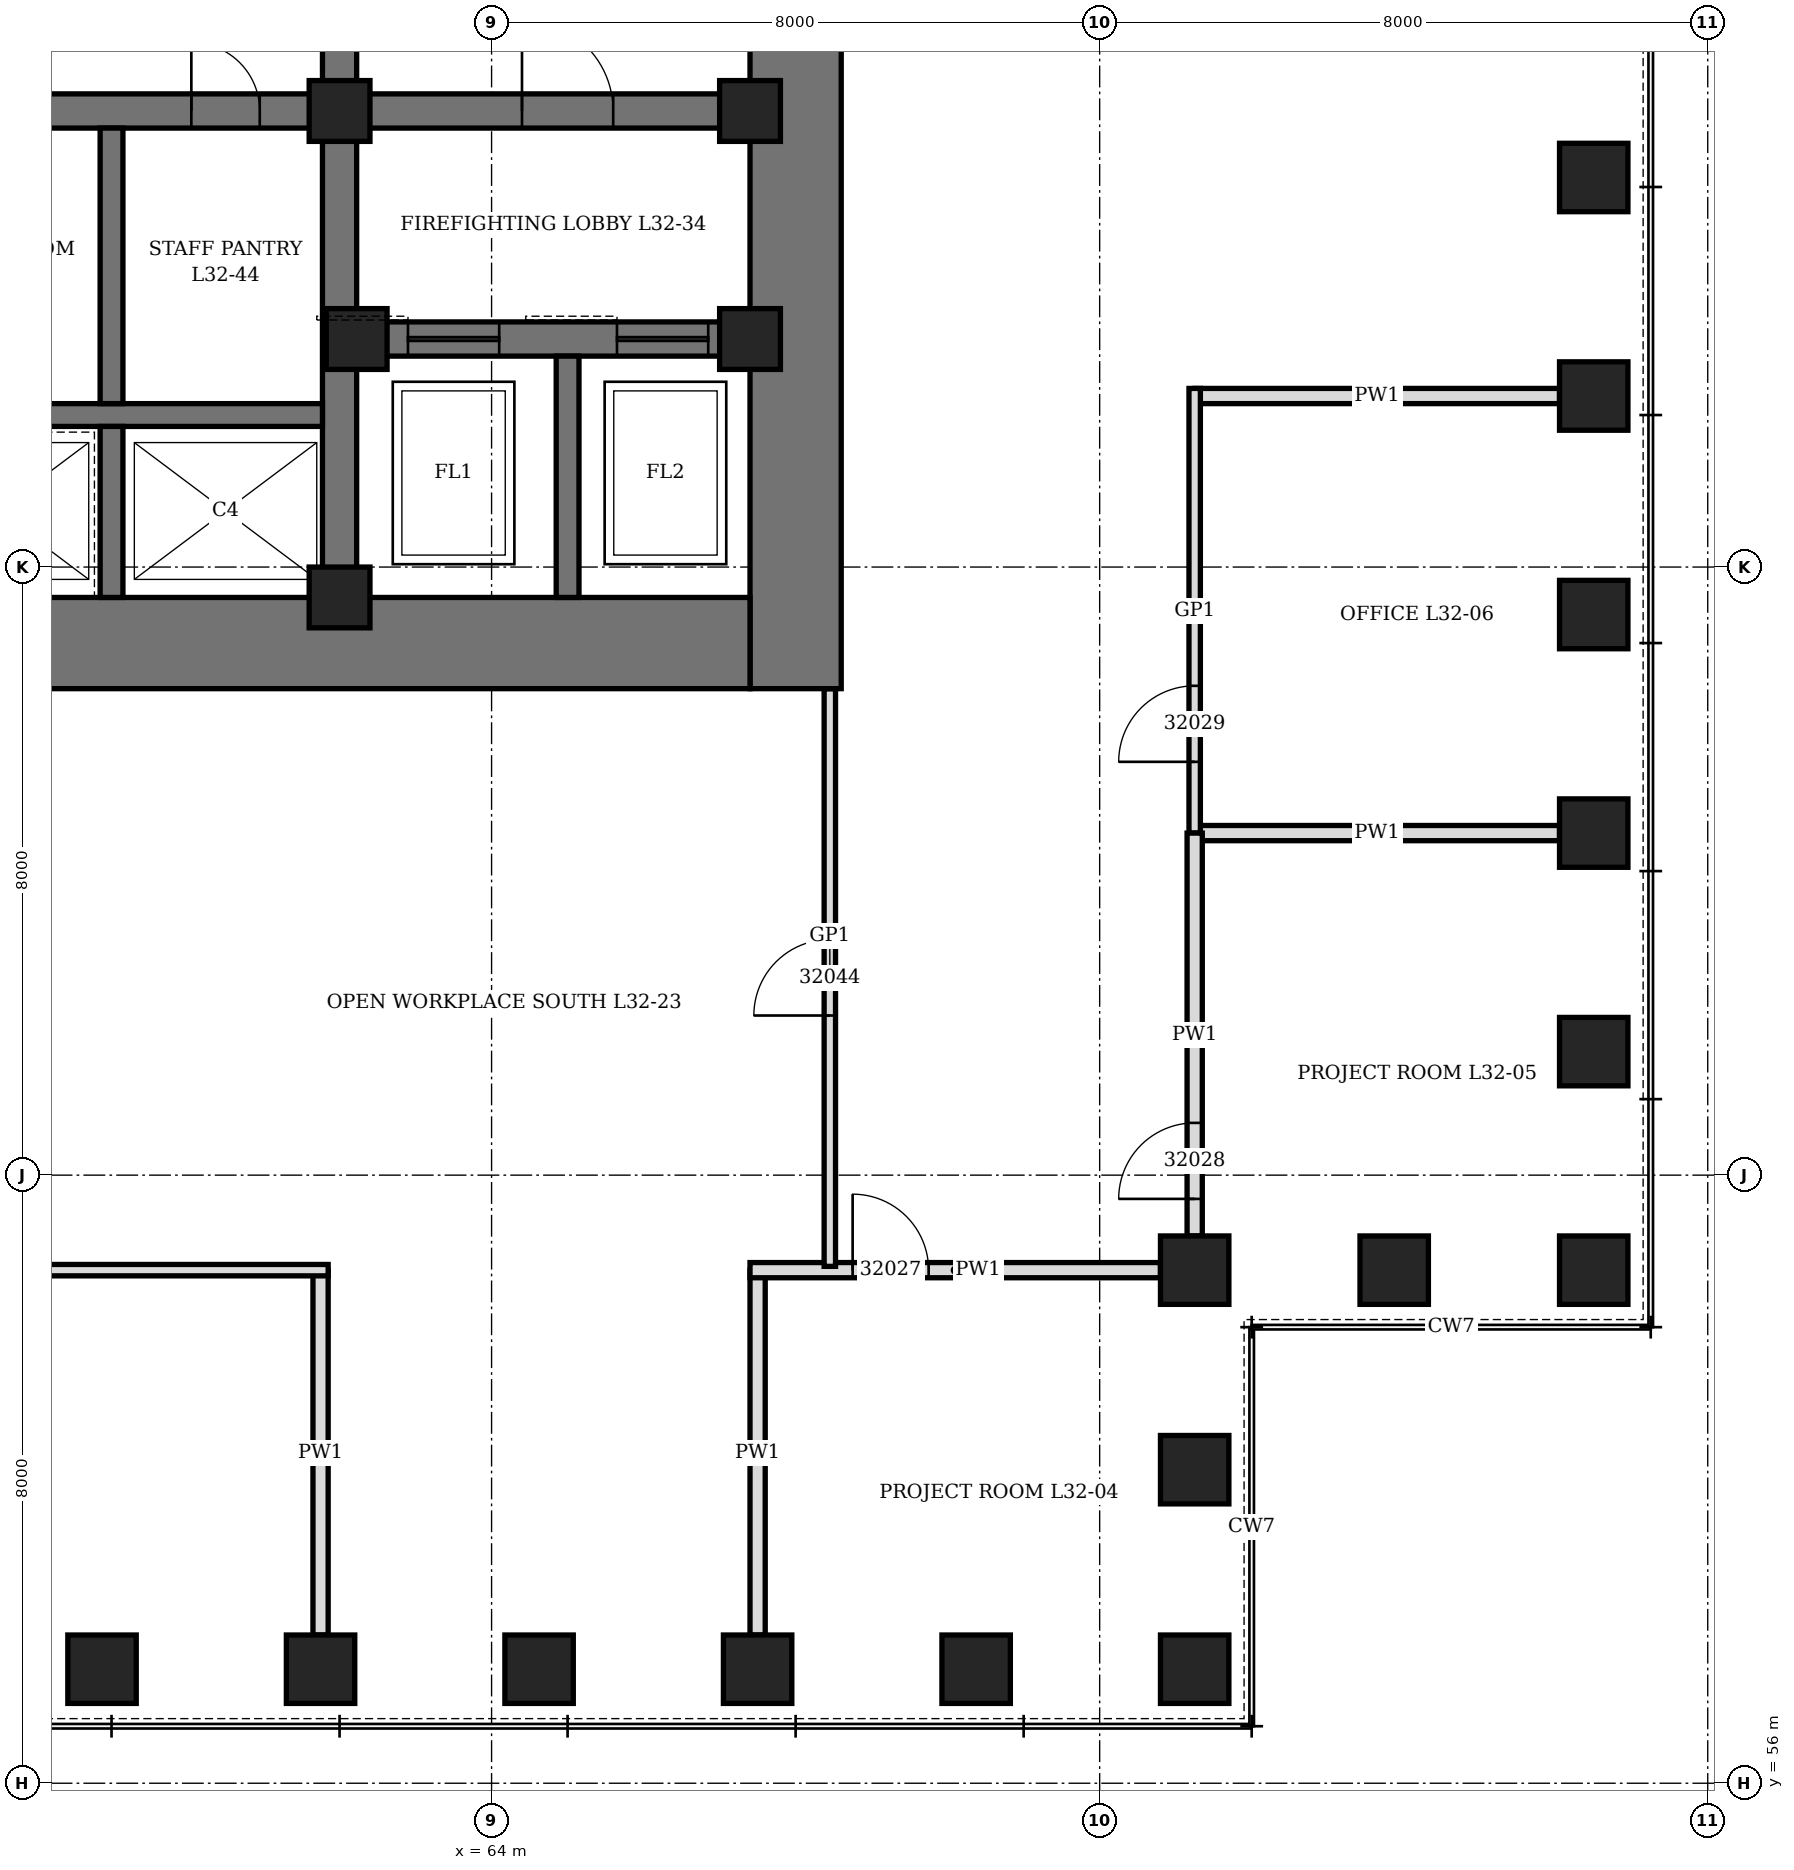
"""IFC4 building model, lengths in metres.
Left out: names, types, materials, properties, quantities, classifications, styles, units other than length and angle.
Written with IfcOpenShell. Run it as: python <this file> out.ifc"""

import sys

from ifc_helpers import new_model, si_unit, direction, frame, frame_2d, origin, origin_2d, place, context, subcontext, project, spatial, rectangle, hollow_rectangle, extrude, element, fill, save


model = new_model("IFC4")
c1 = context("Model", 3, precision=1e-05, world=origin(), true_north=direction((0.0, 1.0)))
c2 = subcontext(c1, "Body", "Model", "MODEL_VIEW")
j1 = project(units=[si_unit("LENGTHUNIT", "METRE"), si_unit("PLANEANGLEUNIT", "RADIAN")], contexts=[c1])
p1 = place(None, origin())
s1 = spatial("IfcSite", under=j1, at=p1, CompositionType="ELEMENT")
p2 = place(p1, origin())
s2 = spatial("IfcBuilding", under=s1, at=p2, CompositionType="ELEMENT")
p3 = place(p2, frame((0.0, 0.0, 145.9)))
s3 = spatial("IfcBuildingStorey", under=s2, at=p3, CompositionType="ELEMENT", Elevation=145.9)
for number, where, z_axis, x_axis in (
    (1, (58.875, 57.5, 0.0), (0.0, 0.0, 1.0), (1.0, 0.0, 0.0)),
    (2, (61.75, 57.5, 0.0), (0.0, 0.0, 1.0), (1.0, 0.0, 0.0)),
    (3, (64.625, 57.5, 0.0), (0.0, 0.0, 1.0), (1.0, 0.0, 0.0)),
    (4, (67.5, 57.5, 0.0), (0.0, 0.0, 1.0), (1.0, 0.0, 0.0)),
    (5, (70.375, 57.5, 0.0), (0.0, 0.0, 1.0), (1.0, 0.0, 0.0)),
    (6, (73.25, 57.5, 0.0), (0.0, 0.0, 1.0), (0.0, 1.0, 0.0)),
    (7, (73.25, 60.125, 0.0), (0.0, 0.0, 1.0), (0.0, 1.0, 0.0)),
    (8, (73.25, 62.75, 0.0), (0.0, 0.0, 1.0), (1.0, 0.0, 0.0)),
    (9, (75.875, 62.75, 0.0), (0.0, 0.0, 1.0), (1.0, 0.0, 0.0)),
    (10, (78.5, 62.75, 0.0), (0.0, 0.0, 1.0), (0.0, 1.0, 0.0)),
    (11, (78.5, 65.625, 0.0), (0.0, 0.0, 1.0), (0.0, 1.0, 0.0)),
    (12, (78.5, 68.5, 0.0), (0.0, 0.0, 1.0), (0.0, 1.0, 0.0)),
    (13, (78.5, 71.375, 0.0), (0.0, 0.0, 1.0), (0.0, 1.0, 0.0)),
    (14, (78.5, 74.25, 0.0), (0.0, 0.0, 1.0), (0.0, 1.0, 0.0)),
    (15, (78.5, 77.125, 0.0), (0.0, 0.0, 1.0), (0.0, 1.0, 0.0)),
):
    element("IfcColumn", number, at=place(p3, frame(where, z_axis=z_axis, x_axis=x_axis)), inside=s3, PredefinedType="COLUMN", context=c2, shape_type="SweptSolid", body=[
        extrude(hollow_rectangle(XDim=0.9, YDim=0.9, WallThickness=0.12, at=origin_2d()), origin(), (0.0, 0.0, 1.0), 4.2),
    ])
p4 = place(p3, frame((68.0, 70.4, 0.0), z_axis=(0.0, 0.0, 1.0), x_axis=(0.0, 1.0, 0.0)))
e16 = element("IfcWall", 16, at=p4, inside=s3, PredefinedType="SHEAR", context=c2, shape_type="SweptSolid", body=[
    extrude(rectangle(XDim=19.2, YDim=1.2, at=frame_2d((9.6, 0.0))), origin(), (0.0, 0.0, 1.0), 4.2),
])
p5 = place(p4, frame((8.6, 0.0, 0.0)))
e17 = element("IfcOpeningElement", 17, at=p5, cuts=e16, PredefinedType="OPENING", context=c2, shape_type="SweptSolid", body=[
    extrude(rectangle(XDim=2.0, YDim=2.4, at=frame_2d((1.0, 1.2))), frame((0.0, 0.61, 0.0), z_axis=(0.0, -1.0, 0.0), x_axis=(1.0, 0.0, 0.0)), (0.0, 0.0, 1.0), 1.22),
])
p6 = place(p3, frame((44.6, 71.0, 0.0), z_axis=(0.0, 0.0, 1.0), x_axis=(1.0, 0.0, 0.0)))
e18 = element("IfcWall", 18, at=p6, inside=s3, PredefinedType="SHEAR", context=c2, shape_type="SweptSolid", body=[
    extrude(rectangle(XDim=22.8, YDim=1.2, at=frame_2d((11.4, 0.0))), origin(), (0.0, 0.0, 1.0), 4.2),
])
p7 = place(p3, frame((62.0, 71.6, 0.0), z_axis=(0.0, 0.0, 1.0), x_axis=(0.0, 1.0, 0.0)))
e19 = element("IfcWall", 19, at=p7, inside=s3, PredefinedType="SHEAR", context=c2, shape_type="SweptSolid", body=[
    extrude(rectangle(XDim=16.8, YDim=0.45, at=frame_2d((8.4, 0.0))), origin(), (0.0, 0.0, 1.0), 4.2),
])
p8 = place(p7, frame((7.5, 0.0, 0.0)))
e20 = element("IfcOpeningElement", 20, at=p8, cuts=e19, PredefinedType="OPENING", context=c2, shape_type="SweptSolid", body=[
    extrude(rectangle(XDim=1.8, YDim=2.4, at=frame_2d((0.9, 1.2))), frame((0.0, 0.235, 0.0), z_axis=(0.0, -1.0, 0.0), x_axis=(1.0, 0.0, 0.0)), (0.0, 0.0, 1.0), 0.47),
])
p9 = place(p3, frame((62.225, 75.0, 0.0), z_axis=(0.0, 0.0, 1.0), x_axis=(1.0, 0.0, 0.0)))
e21 = element("IfcWall", 21, at=p9, inside=s3, PredefinedType="SHEAR", context=c2, shape_type="SweptSolid", body=[
    extrude(rectangle(XDim=5.175, YDim=0.45, at=frame_2d((2.587, 0.0))), origin(), (0.0, 0.0, 1.0), 4.2),
])
p10 = place(p9, frame((0.675, 0.0, 0.0)))
e22 = element("IfcOpeningElement", 22, at=p10, cuts=e21, PredefinedType="OPENING", context=c2, shape_type="SweptSolid", body=[
    extrude(rectangle(XDim=1.2, YDim=2.2, at=frame_2d((0.6, 1.1))), frame((0.0, 0.235, 0.0), z_axis=(0.0, -1.0, 0.0), x_axis=(1.0, 0.0, 0.0)), (0.0, 0.0, 1.0), 0.47),
])
p11 = place(p9, frame((3.425, 0.0, 0.0)))
e23 = element("IfcOpeningElement", 23, at=p11, cuts=e21, PredefinedType="OPENING", context=c2, shape_type="SweptSolid", body=[
    extrude(rectangle(XDim=1.2, YDim=2.2, at=frame_2d((0.6, 1.1))), frame((0.0, 0.235, 0.0), z_axis=(0.0, -1.0, 0.0), x_axis=(1.0, 0.0, 0.0)), (0.0, 0.0, 1.0), 0.47),
])
p12 = place(p3, frame((62.225, 78.0, 0.0), z_axis=(0.0, 0.0, 1.0), x_axis=(1.0, 0.0, 0.0)))
e24 = element("IfcWall", 24, at=p12, inside=s3, PredefinedType="SHEAR", context=c2, shape_type="SweptSolid", body=[
    extrude(rectangle(XDim=5.175, YDim=0.45, at=frame_2d((2.587, 0.0))), origin(), (0.0, 0.0, 1.0), 4.2),
])
p13 = place(p12, frame((2.175, 0.0, 0.0)))
e25 = element("IfcOpeningElement", 25, at=p13, cuts=e24, PredefinedType="OPENING", context=c2, shape_type="SweptSolid", body=[
    extrude(rectangle(XDim=1.2, YDim=2.1, at=frame_2d((0.6, 1.05))), frame((0.0, 0.235, 0.0), z_axis=(0.0, -1.0, 0.0), x_axis=(1.0, 0.0, 0.0)), (0.0, 0.0, 1.0), 0.47),
])
p14 = place(p3, frame((50.225, 78.0, 0.0), z_axis=(0.0, 0.0, 1.0), x_axis=(1.0, 0.0, 0.0)))
e26 = element("IfcWall", 26, at=p14, inside=s3, PredefinedType="SHEAR", context=c2, shape_type="SweptSolid", body=[
    extrude(rectangle(XDim=11.55, YDim=0.45, at=frame_2d((5.775, 0.0))), origin(), (0.0, 0.0, 1.0), 4.2),
])
p15 = place(p14, frame((0.825, 0.0, 0.0)))
e27 = element("IfcOpeningElement", 27, at=p15, cuts=e26, PredefinedType="OPENING", context=c2, shape_type="SweptSolid", body=[
    extrude(rectangle(XDim=0.9, YDim=2.1, at=frame_2d((0.45, 1.05))), frame((0.0, 0.235, 0.0), z_axis=(0.0, -1.0, 0.0), x_axis=(1.0, 0.0, 0.0)), (0.0, 0.0, 1.0), 0.47),
])
p16 = place(p14, frame((3.825, 0.0, 0.0)))
e28 = element("IfcOpeningElement", 28, at=p16, cuts=e26, PredefinedType="OPENING", context=c2, shape_type="SweptSolid", body=[
    extrude(rectangle(XDim=0.9, YDim=2.1, at=frame_2d((0.45, 1.05))), frame((0.0, 0.235, 0.0), z_axis=(0.0, -1.0, 0.0), x_axis=(1.0, 0.0, 0.0)), (0.0, 0.0, 1.0), 0.47),
])
p17 = place(p14, frame((6.825, 0.0, 0.0)))
e29 = element("IfcOpeningElement", 29, at=p17, cuts=e26, PredefinedType="OPENING", context=c2, shape_type="SweptSolid", body=[
    extrude(rectangle(XDim=0.9, YDim=2.1, at=frame_2d((0.45, 1.05))), frame((0.0, 0.235, 0.0), z_axis=(0.0, -1.0, 0.0), x_axis=(1.0, 0.0, 0.0)), (0.0, 0.0, 1.0), 0.47),
])
p18 = place(p14, frame((9.825, 0.0, 0.0)))
e30 = element("IfcOpeningElement", 30, at=p18, cuts=e26, PredefinedType="OPENING", context=c2, shape_type="SweptSolid", body=[
    extrude(rectangle(XDim=0.9, YDim=2.1, at=frame_2d((0.45, 1.05))), frame((0.0, 0.235, 0.0), z_axis=(0.0, -1.0, 0.0), x_axis=(1.0, 0.0, 0.0)), (0.0, 0.0, 1.0), 0.47),
])
p19 = place(p3, frame((50.225, 74.0, 0.0), z_axis=(0.0, 0.0, 1.0), x_axis=(1.0, 0.0, 0.0)))
e31 = element("IfcWall", 31, at=p19, inside=s3, PredefinedType="SHEAR", context=c2, shape_type="SweptSolid", body=[
    extrude(rectangle(XDim=11.55, YDim=0.3, at=frame_2d((5.775, 0.0))), origin(), (0.0, 0.0, 1.0), 4.2),
])
p20 = place(p3, frame((59.0, 71.6, 0.0), z_axis=(0.0, 0.0, 1.0), x_axis=(0.0, 1.0, 0.0)))
e32 = element("IfcWall", 32, at=p20, inside=s3, PredefinedType="SHEAR", context=c2, shape_type="SweptSolid", body=[
    extrude(rectangle(XDim=2.25, YDim=0.3, at=frame_2d((1.125, 0.0))), origin(), (0.0, 0.0, 1.0), 4.2),
])
p21 = place(p3, frame((59.0, 74.15, 0.0), z_axis=(0.0, 0.0, 1.0), x_axis=(0.0, 1.0, 0.0)))
e33 = element("IfcWall", 33, at=p21, inside=s3, PredefinedType="SHEAR", context=c2, shape_type="SweptSolid", body=[
    extrude(rectangle(XDim=3.625, YDim=0.3, at=frame_2d((1.812, 0.0))), origin(), (0.0, 0.0, 1.0), 4.2),
])
p22 = place(p3, frame((65.0, 71.6, 0.0), z_axis=(0.0, 0.0, 1.0), x_axis=(0.0, 1.0, 0.0)))
e34 = element("IfcWall", 34, at=p22, inside=s3, PredefinedType="SHEAR", context=c2, shape_type="SweptSolid", body=[
    extrude(rectangle(XDim=3.175, YDim=0.3, at=frame_2d((1.587, 0.0))), origin(), (0.0, 0.0, 1.0), 4.2),
])
for number, where, z_axis, x_axis in (
    (35, (62.0, 71.6, 0.0), (0.0, 0.0, 1.0), (1.0, 0.0, 0.0)),
    (36, (62.0, 78.0, 0.0), (0.0, 0.0, 1.0), (1.0, 0.0, 0.0)),
    (37, (62.225, 75.0, 0.0), (0.0, 0.0, 1.0), (1.0, 0.0, 0.0)),
    (38, (67.4, 75.0, 0.0), (0.0, 0.0, 1.0), (1.0, 0.0, 0.0)),
    (39, (67.4, 78.0, 0.0), (0.0, 0.0, 1.0), (1.0, 0.0, 0.0)),
):
    element("IfcColumn", number, at=place(p3, frame(where, z_axis=z_axis, x_axis=x_axis)), inside=s3, PredefinedType="COLUMN", context=c2, shape_type="SweptSolid", body=[
        extrude(hollow_rectangle(XDim=0.8, YDim=0.8, WallThickness=0.1, at=origin_2d()), origin(), (0.0, 0.0, 1.0), 4.2),
    ])
p23 = place(p3, frame((61.75, 57.95, 0.0), z_axis=(0.0, 0.0, 1.0), x_axis=(0.0, 1.0, 0.0)))
e40 = element("IfcWall", 40, at=p23, inside=s3, PredefinedType="PARTITIONING", context=c2, shape_type="SweptSolid", body=[
    extrude(rectangle(XDim=4.8, YDim=0.2, at=frame_2d((2.4, 0.0))), origin(), (0.0, 0.0, 1.0), 3.278),
])
p24 = place(p3, frame((67.5, 57.95, 0.0), z_axis=(0.0, 0.0, 1.0), x_axis=(0.0, 1.0, 0.0)))
e41 = element("IfcWall", 41, at=p24, inside=s3, PredefinedType="PARTITIONING", context=c2, shape_type="SweptSolid", body=[
    extrude(rectangle(XDim=4.8, YDim=0.2, at=frame_2d((2.4, 0.0))), origin(), (0.0, 0.0, 1.0), 2.74),
])
for number, where, z_axis, x_axis in (
    (42, (73.25, 68.5, 0.0), (0.0, 0.0, 1.0), (1.0, 0.0, 0.0)),
    (43, (73.25, 74.25, 0.0), (0.0, 0.0, 1.0), (1.0, 0.0, 0.0)),
):
    element("IfcWall", number, at=place(p3, frame(where, z_axis=z_axis, x_axis=x_axis)), inside=s3, PredefinedType="PARTITIONING", context=c2, shape_type="SweptSolid", body=[
        extrude(rectangle(XDim=4.8, YDim=0.2, at=frame_2d((2.4, 0.0))), origin(), (0.0, 0.0, 1.0), 3.428),
    ])
p25 = place(p3, frame((50.15, 62.75, 0.0), z_axis=(0.0, 0.0, 1.0), x_axis=(1.0, 0.0, 0.0)))
e44 = element("IfcWall", 44, at=p25, inside=s3, PredefinedType="PARTITIONING", context=c2, shape_type="SweptSolid", body=[
    extrude(rectangle(XDim=11.7, YDim=0.15, at=frame_2d((5.85, 0.0))), origin(), (0.0, 0.0, 1.0), 4.04),
])
p26 = place(p25, frame((3.913, 0.0, 0.0)))
e45 = element("IfcOpeningElement", 45, at=p26, cuts=e44, PredefinedType="OPENING", context=c2, shape_type="SweptSolid", body=[
    extrude(rectangle(XDim=1.0, YDim=2.4, at=frame_2d((0.5, 1.2))), frame((0.0, 0.085, 0.0), z_axis=(0.0, -1.0, 0.0), x_axis=(1.0, 0.0, 0.0)), (0.0, 0.0, 1.0), 0.17),
])
p27 = place(p3, frame((67.4, 62.75, 0.0), z_axis=(0.0, 0.0, 1.0), x_axis=(1.0, 0.0, 0.0)))
e46 = element("IfcWall", 46, at=p27, inside=s3, PredefinedType="PARTITIONING", context=c2, shape_type="SweptSolid", body=[
    extrude(rectangle(XDim=5.4, YDim=0.2, at=frame_2d((2.7, 0.0))), origin(), (0.0, 0.0, 1.0), 4.04),
])
p28 = place(p27, frame((1.35, 0.0, 0.0)))
e47 = element("IfcOpeningElement", 47, at=p28, cuts=e46, PredefinedType="OPENING", context=c2, shape_type="SweptSolid", body=[
    extrude(rectangle(XDim=1.0, YDim=2.1, at=frame_2d((0.5, 1.05))), frame((0.0, 0.11, 0.0), z_axis=(0.0, -1.0, 0.0), x_axis=(1.0, 0.0, 0.0)), (0.0, 0.0, 1.0), 0.22),
])
p29 = place(p3, frame((68.45, 62.8, 0.0), z_axis=(0.0, 0.0, 1.0), x_axis=(0.0, 1.0, 0.0)))
e48 = element("IfcWall", 48, at=p29, inside=s3, PredefinedType="PARTITIONING", context=c2, shape_type="SweptSolid", body=[
    extrude(rectangle(XDim=7.6, YDim=0.15, at=frame_2d((3.8, 0.0))), origin(), (0.0, 0.0, 1.0), 4.04),
])
p30 = place(p29, frame((3.3, 0.0, 0.0)))
e49 = element("IfcOpeningElement", 49, at=p30, cuts=e48, PredefinedType="OPENING", context=c2, shape_type="SweptSolid", body=[
    extrude(rectangle(XDim=1.0, YDim=2.4, at=frame_2d((0.5, 1.2))), frame((0.0, 0.085, 0.0), z_axis=(0.0, -1.0, 0.0), x_axis=(1.0, 0.0, 0.0)), (0.0, 0.0, 1.0), 0.17),
])
p31 = place(p3, frame((73.25, 68.5, 0.0), z_axis=(0.0, 0.0, 1.0), x_axis=(0.0, 1.0, 0.0)))
e50 = element("IfcWall", 50, at=p31, inside=s3, PredefinedType="PARTITIONING", context=c2, shape_type="SweptSolid", body=[
    extrude(rectangle(XDim=5.85, YDim=0.15, at=frame_2d((2.925, 0.0))), origin(), (0.0, 0.0, 1.0), 4.04),
])
p32 = place(p31, frame((0.938, 0.0, 0.0)))
e51 = element("IfcOpeningElement", 51, at=p32, cuts=e50, PredefinedType="OPENING", context=c2, shape_type="SweptSolid", body=[
    extrude(rectangle(XDim=1.0, YDim=2.1, at=frame_2d((0.5, 1.05))), frame((0.0, 0.085, 0.0), z_axis=(0.0, -1.0, 0.0), x_axis=(1.0, 0.0, 0.0)), (0.0, 0.0, 1.0), 0.17),
])
p33 = place(p3, frame((73.25, 63.2, 0.0), z_axis=(0.0, 0.0, 1.0), x_axis=(0.0, 1.0, 0.0)))
e52 = element("IfcWall", 52, at=p33, inside=s3, PredefinedType="PARTITIONING", context=c2, shape_type="SweptSolid", body=[
    extrude(rectangle(XDim=5.3, YDim=0.2, at=frame_2d((2.65, 0.0))), origin(), (0.0, 0.0, 1.0), 4.04),
])
p34 = place(p33, frame((0.488, 0.0, 0.0)))
e53 = element("IfcOpeningElement", 53, at=p34, cuts=e52, PredefinedType="OPENING", context=c2, shape_type="SweptSolid", body=[
    extrude(rectangle(XDim=1.0, YDim=2.1, at=frame_2d((0.5, 1.05))), frame((0.0, 0.11, 0.0), z_axis=(0.0, -1.0, 0.0), x_axis=(1.0, 0.0, 0.0)), (0.0, 0.0, 1.0), 0.22),
])
p35 = place(p18, origin())
e54 = element("IfcDoor", 54, at=p35, inside=s3, OperationType="SINGLE_SWING_LEFT", PredefinedType="DOOR", context=c2, shape_type="SweptSolid", body=[
    extrude(rectangle(XDim=0.9, YDim=2.1, at=frame_2d((0.45, 1.05))), frame((0.0, 0.225, 0.0), z_axis=(0.0, -1.0, 0.0), x_axis=(1.0, 0.0, 0.0)), (0.0, 0.0, 1.0), 0.449),
])
fill(e30, e54)
p36 = place(p13, origin())
e55 = element("IfcDoor", 55, at=p36, inside=s3, OperationType="SINGLE_SWING_RIGHT", PredefinedType="DOOR", context=c2, shape_type="SweptSolid", body=[
    extrude(rectangle(XDim=1.2, YDim=2.1, at=frame_2d((0.6, 1.05))), frame((0.0, 0.225, 0.0), z_axis=(0.0, -1.0, 0.0), x_axis=(1.0, 0.0, 0.0)), (0.0, 0.0, 1.0), 0.449),
])
fill(e25, e55)
p37 = place(p10, origin())
e56 = element("IfcDoor", 56, at=p37, inside=s3, OperationType="SLIDING_TO_LEFT", PredefinedType="DOOR", context=c2, shape_type="SweptSolid", body=[
    extrude(rectangle(XDim=1.2, YDim=2.2, at=frame_2d((0.6, 1.1))), frame((0.0, 0.225, 0.0), z_axis=(0.0, -1.0, 0.0), x_axis=(1.0, 0.0, 0.0)), (0.0, 0.0, 1.0), 0.449),
])
fill(e22, e56)
p38 = place(p11, origin())
e57 = element("IfcDoor", 57, at=p38, inside=s3, OperationType="SLIDING_TO_LEFT", PredefinedType="DOOR", context=c2, shape_type="SweptSolid", body=[
    extrude(rectangle(XDim=1.2, YDim=2.2, at=frame_2d((0.6, 1.1))), frame((0.0, 0.225, 0.0), z_axis=(0.0, -1.0, 0.0), x_axis=(1.0, 0.0, 0.0)), (0.0, 0.0, 1.0), 0.449),
])
fill(e23, e57)
p39 = place(p28, origin())
e58 = element("IfcDoor", 58, at=p39, inside=s3, OperationType="SINGLE_SWING_LEFT", PredefinedType="DOOR", context=c2, shape_type="SweptSolid", body=[
    extrude(rectangle(XDim=1.0, YDim=2.1, at=frame_2d((0.5, 1.05))), frame((0.0, 0.1, 0.0), z_axis=(0.0, -1.0, 0.0), x_axis=(1.0, 0.0, 0.0)), (0.0, 0.0, 1.0), 0.199),
])
fill(e47, e58)
p40 = place(p34, origin())
e59 = element("IfcDoor", 59, at=p40, inside=s3, OperationType="SINGLE_SWING_LEFT", PredefinedType="DOOR", context=c2, shape_type="SweptSolid", body=[
    extrude(rectangle(XDim=1.0, YDim=2.1, at=frame_2d((0.5, 1.05))), frame((0.0, 0.1, 0.0), z_axis=(0.0, -1.0, 0.0), x_axis=(1.0, 0.0, 0.0)), (0.0, 0.0, 1.0), 0.199),
])
fill(e53, e59)
p41 = place(p32, origin())
e60 = element("IfcDoor", 60, at=p41, inside=s3, OperationType="SINGLE_SWING_LEFT", PredefinedType="DOOR", context=c2, shape_type="SweptSolid", body=[
    extrude(rectangle(XDim=1.0, YDim=2.1, at=frame_2d((0.5, 1.05))), frame((0.0, 0.075, 0.0), z_axis=(0.0, -1.0, 0.0), x_axis=(1.0, 0.0, 0.0)), (0.0, 0.0, 1.0), 0.149),
])
fill(e51, e60)
p42 = place(p30, origin())
e61 = element("IfcDoor", 61, at=p42, inside=s3, OperationType="SINGLE_SWING_RIGHT", PredefinedType="DOOR", context=c2, shape_type="SweptSolid", body=[
    extrude(rectangle(XDim=1.0, YDim=2.4, at=frame_2d((0.5, 1.2))), frame((0.0, 0.075, 0.0), z_axis=(0.0, -1.0, 0.0), x_axis=(1.0, 0.0, 0.0)), (0.0, 0.0, 1.0), 0.149),
])
fill(e49, e61)
save(model, sys.argv[1])
